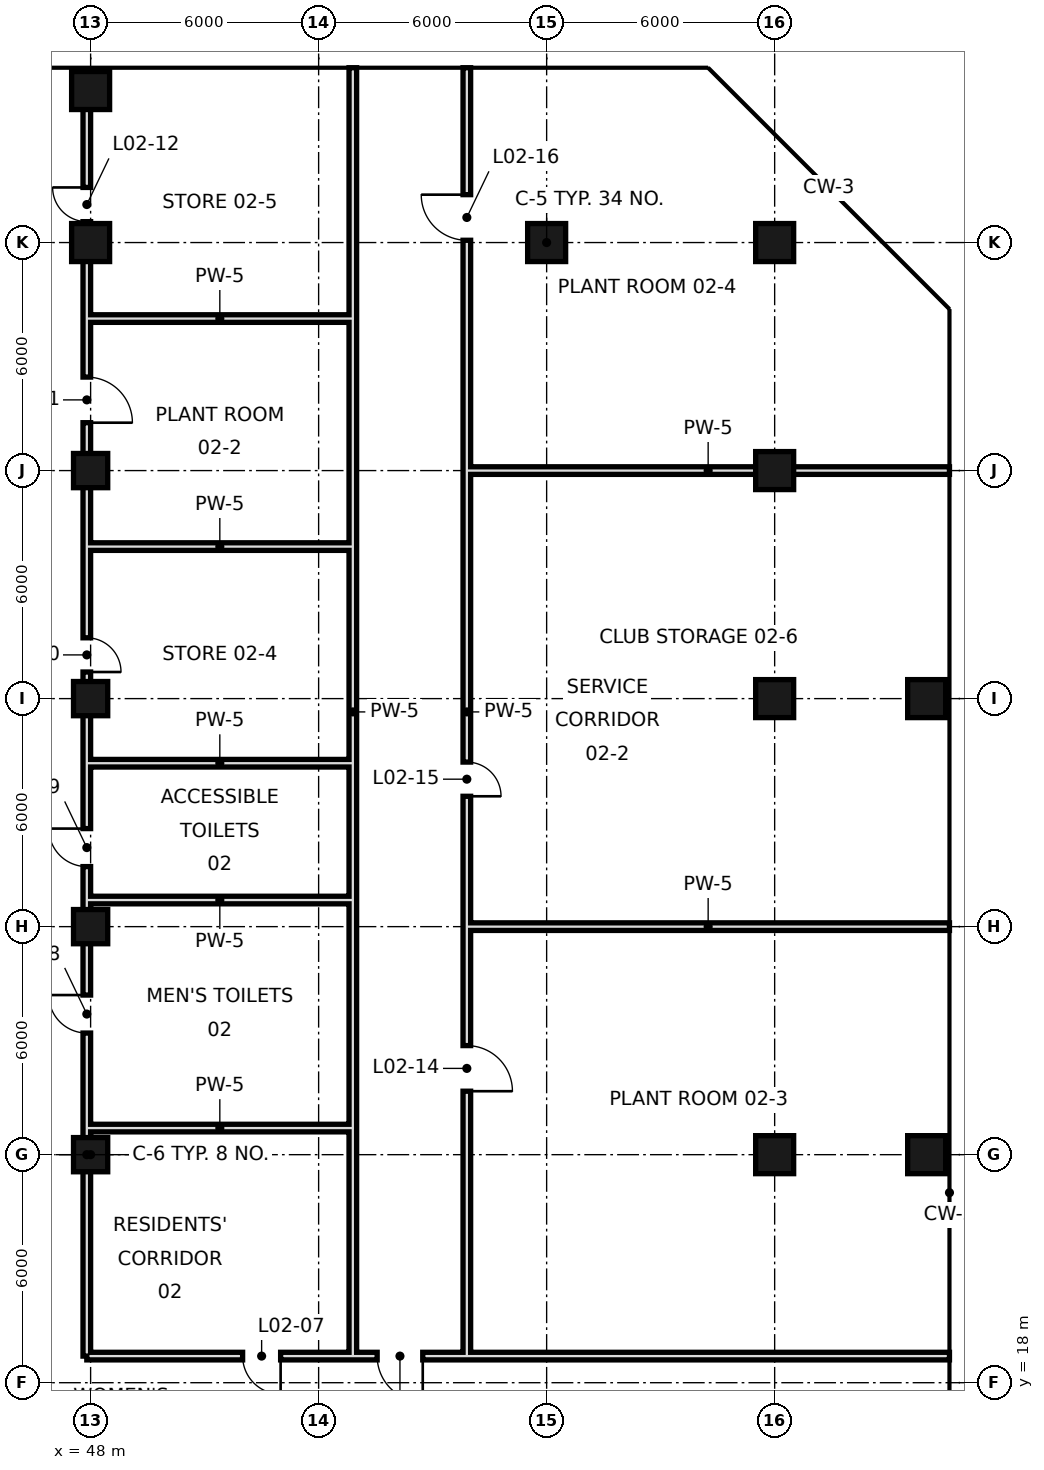
"""IFC4 building model, lengths in metres.
Left out: names, types, materials, properties, quantities, classifications, styles, units other than length and angle.
Written with IfcOpenShell. Run it as: python <this file> out.ifc"""

import sys

from ifc_helpers import new_model, si_unit, direction, frame, frame_2d, origin, origin_2d, place, context, subcontext, project, spatial, rectangle, hollow_rectangle, extrude, element, fill, save


model = new_model("IFC4")
c1 = context("Model", 3, precision=1e-05, world=origin(), true_north=direction((0.0, 1.0)))
c2 = subcontext(c1, "Body", "Model", "MODEL_VIEW")
j1 = project(units=[si_unit("LENGTHUNIT", "METRE"), si_unit("PLANEANGLEUNIT", "RADIAN")], contexts=[c1])
p1 = place(None, origin())
s1 = spatial("IfcSite", under=j1, at=p1, CompositionType="ELEMENT")
p2 = place(p1, origin())
s2 = spatial("IfcBuilding", under=s1, at=p2, CompositionType="ELEMENT")
p3 = place(p2, frame((0.0, 0.0, 20.4)))
s3 = spatial("IfcBuildingStorey", under=s2, at=p3, CompositionType="ELEMENT", Elevation=20.4)
p4 = place(p3, frame((48.0, 24.0, 0.0), z_axis=(0.0, 0.0, 1.0), x_axis=(1.0, 0.0, 0.0)))
e1 = element("IfcColumn", 1, at=p4, inside=s3, PredefinedType="COLUMN", context=c2, shape_type="SweptSolid", body=[
    extrude(hollow_rectangle(XDim=0.9, YDim=0.9, WallThickness=0.045, at=origin_2d()), origin(), (0.0, 0.0, 1.0), 4.8),
])
p5 = place(p3, frame((48.0, 30.0, -0.4), z_axis=(0.0, 0.0, 1.0), x_axis=(1.0, 0.0, 0.0)))
e2 = element("IfcColumn", 2, at=p5, inside=s3, PredefinedType="COLUMN", context=c2, shape_type="SweptSolid", body=[
    extrude(hollow_rectangle(XDim=0.9, YDim=0.9, WallThickness=0.045, at=origin_2d()), origin(), (0.0, 0.0, 1.0), 5.2),
])
p6 = place(p3, frame((48.0, 36.0, 0.0), z_axis=(0.0, 0.0, 1.0), x_axis=(1.0, 0.0, 0.0)))
e3 = element("IfcColumn", 3, at=p6, inside=s3, PredefinedType="COLUMN", context=c2, shape_type="SweptSolid", body=[
    extrude(hollow_rectangle(XDim=0.9, YDim=0.9, WallThickness=0.045, at=origin_2d()), origin(), (0.0, 0.0, 1.0), 4.8),
])
p7 = place(p3, frame((48.0, 42.0, -0.4), z_axis=(0.0, 0.0, 1.0), x_axis=(1.0, 0.0, 0.0)))
e4 = element("IfcColumn", 4, at=p7, inside=s3, PredefinedType="COLUMN", context=c2, shape_type="SweptSolid", body=[
    extrude(hollow_rectangle(XDim=0.9, YDim=0.9, WallThickness=0.045, at=origin_2d()), origin(), (0.0, 0.0, 1.0), 5.2),
])
p8 = place(p3, frame((48.0, 48.0, 0.0), z_axis=(0.0, 0.0, 1.0), x_axis=(1.0, 0.0, 0.0)))
e5 = element("IfcColumn", 5, at=p8, inside=s3, PredefinedType="COLUMN", context=c2, shape_type="SweptSolid", body=[
    extrude(hollow_rectangle(XDim=1.0, YDim=1.0, WallThickness=0.05, at=origin_2d()), origin(), (0.0, 0.0, 1.0), 4.8),
])
for number, where, z_axis, x_axis in (
    (6, (48.0, 52.0, -0.4), (0.0, 0.0, 1.0), (1.0, 0.0, 0.0)),
    (7, (60.0, 48.0, -0.4), (0.0, 0.0, 1.0), (1.0, 0.0, 0.0)),
):
    element("IfcColumn", number, at=place(p3, frame(where, z_axis=z_axis, x_axis=x_axis)), inside=s3, PredefinedType="COLUMN", context=c2, shape_type="SweptSolid", body=[
        extrude(hollow_rectangle(XDim=1.0, YDim=1.0, WallThickness=0.05, at=origin_2d()), origin(), (0.0, 0.0, 1.0), 5.2),
    ])
for number, where, z_axis, x_axis in (
    (8, (66.0, 24.0, 0.0), (0.0, 0.0, 1.0), (1.0, 0.0, 0.0)),
    (9, (66.0, 36.0, 0.0), (0.0, 0.0, 1.0), (1.0, 0.0, 0.0)),
):
    element("IfcColumn", number, at=place(p3, frame(where, z_axis=z_axis, x_axis=x_axis)), inside=s3, PredefinedType="COLUMN", context=c2, shape_type="SweptSolid", body=[
        extrude(hollow_rectangle(XDim=1.0, YDim=1.0, WallThickness=0.05, at=origin_2d()), origin(), (0.0, 0.0, 1.0), 4.8),
    ])
p9 = place(p3, frame((66.0, 42.0, -0.4), z_axis=(0.0, 0.0, 1.0), x_axis=(1.0, 0.0, 0.0)))
e10 = element("IfcColumn", 10, at=p9, inside=s3, PredefinedType="COLUMN", context=c2, shape_type="SweptSolid", body=[
    extrude(hollow_rectangle(XDim=1.0, YDim=1.0, WallThickness=0.05, at=origin_2d()), origin(), (0.0, 0.0, 1.0), 5.2),
])
p10 = place(p3, frame((66.0, 48.0, 0.0), z_axis=(0.0, 0.0, 1.0), x_axis=(1.0, 0.0, 0.0)))
e11 = element("IfcColumn", 11, at=p10, inside=s3, PredefinedType="COLUMN", context=c2, shape_type="SweptSolid", body=[
    extrude(hollow_rectangle(XDim=1.0, YDim=1.0, WallThickness=0.05, at=origin_2d()), origin(), (0.0, 0.0, 1.0), 4.8),
])
for number, where, z_axis, x_axis in (
    (12, (70.0, 24.0, -0.4), (0.0, 0.0, 1.0), (1.0, 0.0, 0.0)),
    (13, (70.0, 36.0, -0.4), (0.0, 0.0, 1.0), (1.0, 0.0, 0.0)),
):
    element("IfcColumn", number, at=place(p3, frame(where, z_axis=z_axis, x_axis=x_axis)), inside=s3, PredefinedType="COLUMN", context=c2, shape_type="SweptSolid", body=[
        extrude(hollow_rectangle(XDim=1.0, YDim=1.0, WallThickness=0.05, at=origin_2d()), origin(), (0.0, 0.0, 1.0), 5.2),
    ])
p11 = place(p3, frame((47.9, 18.7, 0.0), z_axis=(0.0, 0.0, 1.0), x_axis=(0.0, 1.0, 0.0)))
e14 = element("IfcWall", 14, at=p11, inside=s3, PredefinedType="SOLIDWALL", context=c2, shape_type="SweptSolid", body=[
    extrude(rectangle(XDim=33.3, YDim=0.2, at=frame_2d((16.65, 0.0))), origin(), (0.0, 0.0, 1.0), 3.7),
])
p12 = place(p11, frame((8.5, 0.0, 0.0)))
e15 = element("IfcOpeningElement", 15, at=p12, cuts=e14, PredefinedType="OPENING", context=c2, shape_type="SweptSolid", body=[
    extrude(rectangle(XDim=1.0, YDim=2.4, at=frame_2d((0.5, 1.2))), frame((0.0, 0.11, 0.0), z_axis=(0.0, -1.0, 0.0), x_axis=(1.0, 0.0, 0.0)), (0.0, 0.0, 1.0), 0.22),
])
p13 = place(p11, frame((12.88, 0.0, 0.0)))
e16 = element("IfcOpeningElement", 16, at=p13, cuts=e14, PredefinedType="OPENING", context=c2, shape_type="SweptSolid", body=[
    extrude(rectangle(XDim=1.0, YDim=2.4, at=frame_2d((0.5, 1.2))), frame((0.0, 0.11, 0.0), z_axis=(0.0, -1.0, 0.0), x_axis=(1.0, 0.0, 0.0)), (0.0, 0.0, 1.0), 0.22),
])
p14 = place(p11, frame((18.0, 0.0, 0.0)))
e17 = element("IfcOpeningElement", 17, at=p14, cuts=e14, PredefinedType="OPENING", context=c2, shape_type="SweptSolid", body=[
    extrude(rectangle(XDim=0.9, YDim=2.1, at=frame_2d((0.45, 1.05))), frame((0.0, 0.11, 0.0), z_axis=(0.0, -1.0, 0.0), x_axis=(1.0, 0.0, 0.0)), (0.0, 0.0, 1.0), 0.22),
])
p15 = place(p11, frame((24.56, 0.0, 0.0)))
e18 = element("IfcOpeningElement", 18, at=p15, cuts=e14, PredefinedType="OPENING", context=c2, shape_type="SweptSolid", body=[
    extrude(rectangle(XDim=1.2, YDim=2.4, at=frame_2d((0.6, 1.2))), frame((0.0, 0.11, 0.0), z_axis=(0.0, -1.0, 0.0), x_axis=(1.0, 0.0, 0.0)), (0.0, 0.0, 1.0), 0.22),
])
p16 = place(p11, frame((29.85, 0.0, 0.0)))
e19 = element("IfcOpeningElement", 19, at=p16, cuts=e14, PredefinedType="OPENING", context=c2, shape_type="SweptSolid", body=[
    extrude(rectangle(XDim=0.9, YDim=2.1, at=frame_2d((0.45, 1.05))), frame((0.0, 0.11, 0.0), z_axis=(0.0, -1.0, 0.0), x_axis=(1.0, 0.0, 0.0)), (0.0, 0.0, 1.0), 0.22),
])
p17 = place(p3, frame((54.9, 18.7, 0.0), z_axis=(0.0, 0.0, 1.0), x_axis=(0.0, 1.0, 0.0)))
e20 = element("IfcWall", 20, at=p17, inside=s3, PredefinedType="SOLIDWALL", context=c2, shape_type="SweptSolid", body=[
    extrude(rectangle(XDim=33.9, YDim=0.2, at=frame_2d((16.95, 0.0))), origin(), (0.0, 0.0, 1.0), 3.5),
])
p18 = place(p3, frame((57.9, 18.7, 0.0), z_axis=(0.0, 0.0, 1.0), x_axis=(0.0, 1.0, 0.0)))
e21 = element("IfcWall", 21, at=p18, inside=s3, PredefinedType="SOLIDWALL", context=c2, shape_type="SweptSolid", body=[
    extrude(rectangle(XDim=33.9, YDim=0.2, at=frame_2d((16.95, 0.0))), origin(), (0.0, 0.0, 1.0), 3.5),
])
p19 = place(p18, frame((6.97, 0.0, 0.0)))
e22 = element("IfcOpeningElement", 22, at=p19, cuts=e21, PredefinedType="OPENING", context=c2, shape_type="SweptSolid", body=[
    extrude(rectangle(XDim=1.2, YDim=2.4, at=frame_2d((0.6, 1.2))), frame((0.0, 0.11, 0.0), z_axis=(0.0, -1.0, 0.0), x_axis=(1.0, 0.0, 0.0)), (0.0, 0.0, 1.0), 0.22),
])
p20 = place(p18, frame((14.73, 0.0, 0.0)))
e23 = element("IfcOpeningElement", 23, at=p20, cuts=e21, PredefinedType="OPENING", context=c2, shape_type="SweptSolid", body=[
    extrude(rectangle(XDim=0.9, YDim=2.1, at=frame_2d((0.45, 1.05))), frame((0.0, 0.11, 0.0), z_axis=(0.0, -1.0, 0.0), x_axis=(1.0, 0.0, 0.0)), (0.0, 0.0, 1.0), 0.22),
])
p21 = place(p18, frame((29.36, 0.0, 0.0)))
e24 = element("IfcOpeningElement", 24, at=p21, cuts=e21, PredefinedType="OPENING", context=c2, shape_type="SweptSolid", body=[
    extrude(rectangle(XDim=1.2, YDim=2.4, at=frame_2d((0.6, 1.2))), frame((0.0, 0.11, 0.0), z_axis=(0.0, -1.0, 0.0), x_axis=(1.0, 0.0, 0.0)), (0.0, 0.0, 1.0), 0.22),
])
p22 = place(p3, frame((47.9, 18.7, 0.0), z_axis=(0.0, 0.0, 1.0), x_axis=(1.0, 0.0, 0.0)))
e25 = element("IfcWall", 25, at=p22, inside=s3, PredefinedType="SOLIDWALL", context=c2, shape_type="SweptSolid", body=[
    extrude(rectangle(XDim=22.7, YDim=0.2, at=frame_2d((11.35, 0.0))), origin(), (0.0, 0.0, 1.0), 3.7),
])
p23 = place(p22, frame((4.1, 0.0, 0.0)))
e26 = element("IfcOpeningElement", 26, at=p23, cuts=e25, PredefinedType="OPENING", context=c2, shape_type="SweptSolid", body=[
    extrude(rectangle(XDim=1.0, YDim=2.4, at=frame_2d((0.5, 1.2))), frame((0.0, 0.11, 0.0), z_axis=(0.0, -1.0, 0.0), x_axis=(1.0, 0.0, 0.0)), (0.0, 0.0, 1.0), 0.22),
])
p24 = place(p22, frame((7.64, 0.0, 0.0)))
e27 = element("IfcOpeningElement", 27, at=p24, cuts=e25, PredefinedType="OPENING", context=c2, shape_type="SweptSolid", body=[
    extrude(rectangle(XDim=1.2, YDim=2.4, at=frame_2d((0.6, 1.2))), frame((0.0, 0.11, 0.0), z_axis=(0.0, -1.0, 0.0), x_axis=(1.0, 0.0, 0.0)), (0.0, 0.0, 1.0), 0.22),
])
p25 = place(p3, frame((47.9, 24.7, 0.0), z_axis=(0.0, 0.0, 1.0), x_axis=(1.0, 0.0, 0.0)))
e28 = element("IfcWall", 28, at=p25, inside=s3, PredefinedType="SOLIDWALL", context=c2, shape_type="SweptSolid", body=[
    extrude(rectangle(XDim=7.0, YDim=0.2, at=frame_2d((3.5, 0.0))), origin(), (0.0, 0.0, 1.0), 3.95),
])
p26 = place(p3, frame((57.9, 30.0, 0.0), z_axis=(0.0, 0.0, 1.0), x_axis=(1.0, 0.0, 0.0)))
e29 = element("IfcWall", 29, at=p26, inside=s3, PredefinedType="SOLIDWALL", context=c2, shape_type="SweptSolid", body=[
    extrude(rectangle(XDim=12.7, YDim=0.2, at=frame_2d((6.35, 0.0))), origin(), (0.0, 0.0, 1.0), 3.5),
])
for number, where, z_axis, x_axis in (
    (30, (47.9, 30.7, 0.0), (0.0, 0.0, 1.0), (1.0, 0.0, 0.0)),
    (31, (47.9, 34.3, 0.0), (0.0, 0.0, 1.0), (1.0, 0.0, 0.0)),
    (32, (47.9, 40.0, 0.0), (0.0, 0.0, 1.0), (1.0, 0.0, 0.0)),
):
    element("IfcWall", number, at=place(p3, frame(where, z_axis=z_axis, x_axis=x_axis)), inside=s3, PredefinedType="SOLIDWALL", context=c2, shape_type="SweptSolid", body=[
        extrude(rectangle(XDim=7.0, YDim=0.2, at=frame_2d((3.5, 0.0))), origin(), (0.0, 0.0, 1.0), 3.95),
    ])
p27 = place(p3, frame((57.9, 42.0, 0.0), z_axis=(0.0, 0.0, 1.0), x_axis=(1.0, 0.0, 0.0)))
e33 = element("IfcWall", 33, at=p27, inside=s3, PredefinedType="SOLIDWALL", context=c2, shape_type="SweptSolid", body=[
    extrude(rectangle(XDim=12.7, YDim=0.2, at=frame_2d((6.35, 0.0))), origin(), (0.0, 0.0, 1.0), 3.5),
])
p28 = place(p3, frame((47.9, 46.0, 0.0), z_axis=(0.0, 0.0, 1.0), x_axis=(1.0, 0.0, 0.0)))
e34 = element("IfcWall", 34, at=p28, inside=s3, PredefinedType="SOLIDWALL", context=c2, shape_type="SweptSolid", body=[
    extrude(rectangle(XDim=7.0, YDim=0.2, at=frame_2d((3.5, 0.0))), origin(), (0.0, 0.0, 1.0), 3.95),
])
p29 = place(p23, origin())
e35 = element("IfcDoor", 35, at=p29, inside=s3, OperationType="SINGLE_SWING_RIGHT", PredefinedType="DOOR", context=c2, shape_type="SweptSolid", body=[
    extrude(rectangle(XDim=1.0, YDim=2.4, at=frame_2d((0.5, 1.2))), frame((0.0, 0.025, 0.0), z_axis=(0.0, -1.0, 0.0), x_axis=(1.0, 0.0, 0.0)), (0.0, 0.0, 1.0), 0.05),
])
fill(e26, e35)
p30 = place(p12, frame((1.0, 0.0, 0.0), z_axis=(0.0, 0.0, 1.0), x_axis=(-1.0, 0.0, 0.0)))
e36 = element("IfcDoor", 36, at=p30, inside=s3, OperationType="SINGLE_SWING_LEFT", PredefinedType="DOOR", context=c2, shape_type="SweptSolid", body=[
    extrude(rectangle(XDim=1.0, YDim=2.4, at=frame_2d((0.5, 1.2))), frame((0.0, 0.025, 0.0), z_axis=(0.0, -1.0, 0.0), x_axis=(1.0, 0.0, 0.0)), (0.0, 0.0, 1.0), 0.05),
])
fill(e15, e36)
p31 = place(p13, frame((1.0, 0.0, 0.0), z_axis=(0.0, 0.0, 1.0), x_axis=(-1.0, 0.0, 0.0)))
e37 = element("IfcDoor", 37, at=p31, inside=s3, OperationType="SINGLE_SWING_LEFT", PredefinedType="DOOR", context=c2, shape_type="SweptSolid", body=[
    extrude(rectangle(XDim=1.0, YDim=2.4, at=frame_2d((0.5, 1.2))), frame((0.0, 0.025, 0.0), z_axis=(0.0, -1.0, 0.0), x_axis=(1.0, 0.0, 0.0)), (0.0, 0.0, 1.0), 0.05),
])
fill(e16, e37)
p32 = place(p14, frame((0.9, 0.0, 0.0), z_axis=(0.0, 0.0, 1.0), x_axis=(-1.0, 0.0, 0.0)))
e38 = element("IfcDoor", 38, at=p32, inside=s3, OperationType="SINGLE_SWING_RIGHT", PredefinedType="DOOR", context=c2, shape_type="SweptSolid", body=[
    extrude(rectangle(XDim=0.9, YDim=2.1, at=frame_2d((0.45, 1.05))), frame((0.0, 0.025, 0.0), z_axis=(0.0, -1.0, 0.0), x_axis=(1.0, 0.0, 0.0)), (0.0, 0.0, 1.0), 0.05),
])
fill(e17, e38)
p33 = place(p15, frame((1.2, 0.0, 0.0), z_axis=(0.0, 0.0, 1.0), x_axis=(-1.0, 0.0, 0.0)))
e39 = element("IfcDoor", 39, at=p33, inside=s3, OperationType="SINGLE_SWING_RIGHT", PredefinedType="DOOR", context=c2, shape_type="SweptSolid", body=[
    extrude(rectangle(XDim=1.2, YDim=2.4, at=frame_2d((0.6, 1.2))), frame((0.0, 0.025, 0.0), z_axis=(0.0, -1.0, 0.0), x_axis=(1.0, 0.0, 0.0)), (0.0, 0.0, 1.0), 0.05),
])
fill(e18, e39)
p34 = place(p16, frame((0.9, 0.0, 0.0), z_axis=(0.0, 0.0, 1.0), x_axis=(-1.0, 0.0, 0.0)))
e40 = element("IfcDoor", 40, at=p34, inside=s3, OperationType="SINGLE_SWING_LEFT", PredefinedType="DOOR", context=c2, shape_type="SweptSolid", body=[
    extrude(rectangle(XDim=0.9, YDim=2.1, at=frame_2d((0.45, 1.05))), frame((0.0, 0.025, 0.0), z_axis=(0.0, -1.0, 0.0), x_axis=(1.0, 0.0, 0.0)), (0.0, 0.0, 1.0), 0.05),
])
fill(e19, e40)
p35 = place(p24, origin())
e41 = element("IfcDoor", 41, at=p35, inside=s3, OperationType="SINGLE_SWING_RIGHT", PredefinedType="DOOR", context=c2, shape_type="SweptSolid", body=[
    extrude(rectangle(XDim=1.2, YDim=2.4, at=frame_2d((0.6, 1.2))), frame((0.0, 0.025, 0.0), z_axis=(0.0, -1.0, 0.0), x_axis=(1.0, 0.0, 0.0)), (0.0, 0.0, 1.0), 0.05),
])
fill(e27, e41)
p36 = place(p19, frame((1.2, 0.0, 0.0), z_axis=(0.0, 0.0, 1.0), x_axis=(-1.0, 0.0, 0.0)))
e42 = element("IfcDoor", 42, at=p36, inside=s3, OperationType="SINGLE_SWING_RIGHT", PredefinedType="DOOR", context=c2, shape_type="SweptSolid", body=[
    extrude(rectangle(XDim=1.2, YDim=2.4, at=frame_2d((0.6, 1.2))), frame((0.0, 0.025, 0.0), z_axis=(0.0, -1.0, 0.0), x_axis=(1.0, 0.0, 0.0)), (0.0, 0.0, 1.0), 0.05),
])
fill(e22, e42)
p37 = place(p20, frame((0.9, 0.0, 0.0), z_axis=(0.0, 0.0, 1.0), x_axis=(-1.0, 0.0, 0.0)))
e43 = element("IfcDoor", 43, at=p37, inside=s3, OperationType="SINGLE_SWING_RIGHT", PredefinedType="DOOR", context=c2, shape_type="SweptSolid", body=[
    extrude(rectangle(XDim=0.9, YDim=2.1, at=frame_2d((0.45, 1.05))), frame((0.0, 0.025, 0.0), z_axis=(0.0, -1.0, 0.0), x_axis=(1.0, 0.0, 0.0)), (0.0, 0.0, 1.0), 0.05),
])
fill(e23, e43)
p38 = place(p21, frame((1.2, 0.0, 0.0), z_axis=(0.0, 0.0, 1.0), x_axis=(-1.0, 0.0, 0.0)))
e44 = element("IfcDoor", 44, at=p38, inside=s3, OperationType="SINGLE_SWING_LEFT", PredefinedType="DOOR", context=c2, shape_type="SweptSolid", body=[
    extrude(rectangle(XDim=1.2, YDim=2.4, at=frame_2d((0.6, 1.2))), frame((0.0, 0.025, 0.0), z_axis=(0.0, -1.0, 0.0), x_axis=(1.0, 0.0, 0.0)), (0.0, 0.0, 1.0), 0.05),
])
fill(e24, e44)
save(model, sys.argv[1])
